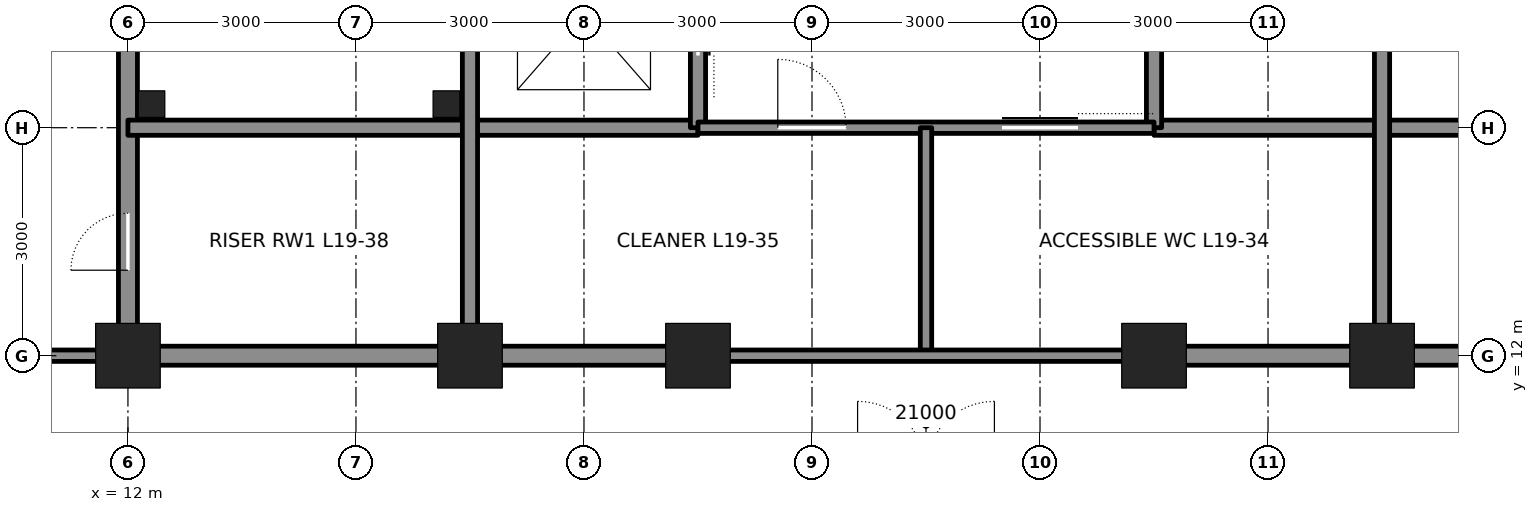
"""IFC4 building model, lengths in metres.
Left out: names, types, materials, properties, quantities, classifications, styles, units other than length and angle.
Written with IfcOpenShell. Run it as: python <this file> out.ifc"""

import sys

from ifc_helpers import new_model, si_unit, direction, frame, frame_2d, origin, origin_2d, place, context, subcontext, project, spatial, rectangle, hollow_rectangle, extrude, element, fill, save


model = new_model("IFC4")
c1 = context("Model", 3, precision=1e-05, world=origin(), true_north=direction((0.0, 1.0)))
c2 = subcontext(c1, "Body", "Model", "MODEL_VIEW")
j1 = project(units=[si_unit("LENGTHUNIT", "METRE"), si_unit("PLANEANGLEUNIT", "RADIAN")], contexts=[c1])
p1 = place(None, origin())
s1 = spatial("IfcSite", under=j1, at=p1, CompositionType="ELEMENT")
p2 = place(p1, origin())
s2 = spatial("IfcBuilding", under=s1, at=p2, CompositionType="ELEMENT")
p3 = place(p2, frame((0.0, 0.0, 91.8)))
s3 = spatial("IfcBuildingStorey", under=s2, at=p3, CompositionType="ELEMENT", Elevation=91.8)
for number, where, z_axis, x_axis in (
    (1, (12.0, 12.0, 0.0), (0.0, 0.0, 1.0), (1.0, 0.0, 0.0)),
    (2, (16.5, 12.0, 0.0), (0.0, 0.0, 1.0), (1.0, 0.0, 0.0)),
    (3, (19.5, 12.0, 0.0), (0.0, 0.0, 1.0), (1.0, 0.0, 0.0)),
    (4, (25.5, 12.0, 0.0), (0.0, 0.0, 1.0), (1.0, 0.0, 0.0)),
    (5, (28.5, 12.0, 0.0), (0.0, 0.0, 1.0), (1.0, 0.0, 0.0)),
):
    element("IfcColumn", number, at=place(p3, frame(where, z_axis=z_axis, x_axis=x_axis)), inside=s3, PredefinedType="COLUMN", context=c2, shape_type="SweptSolid", body=[
        extrude(hollow_rectangle(XDim=0.85, YDim=0.85, WallThickness=0.085, at=origin_2d()), origin(), (0.0, 0.0, 1.0), 4.5),
    ])
p4 = place(p3, frame((12.0, 12.25, 0.0), z_axis=(0.0, 0.0, 1.0), x_axis=(0.0, 1.0, 0.0)))
e6 = element("IfcWall", 6, at=p4, inside=s3, PredefinedType="SOLIDWALL", context=c2, shape_type="SweptSolid", body=[
    extrude(rectangle(XDim=8.5, YDim=0.25, at=frame_2d((4.25, 0.0))), origin(), (0.0, 0.0, 1.0), 3.413),
])
p5 = place(p4, frame((0.875, 0.0, 0.0)))
e7 = element("IfcOpeningElement", 7, at=p5, cuts=e6, PredefinedType="OPENING", context=c2, shape_type="SweptSolid", body=[
    extrude(rectangle(XDim=0.75, YDim=2.1, at=frame_2d((0.375, 1.05))), frame((0.0, 0.135, 0.0), z_axis=(0.0, -1.0, 0.0), x_axis=(1.0, 0.0, 0.0)), (0.0, 0.0, 1.0), 0.27),
])
p6 = place(p3, frame((12.25, 12.0, 0.0), z_axis=(0.0, 0.0, 1.0), x_axis=(1.0, 0.0, 0.0)))
e8 = element("IfcWall", 8, at=p6, inside=s3, PredefinedType="SOLIDWALL", context=c2, shape_type="SweptSolid", body=[
    extrude(rectangle(XDim=4.0, YDim=0.25, at=frame_2d((2.0, 0.0))), origin(), (0.0, 0.0, 1.0), 3.481),
])
for number, where, z_axis, x_axis in (
    (9, (16.75, 12.0, 0.0), (0.0, 0.0, 1.0), (1.0, 0.0, 0.0)),
    (10, (25.75, 12.0, 0.0), (0.0, 0.0, 1.0), (1.0, 0.0, 0.0)),
):
    element("IfcWall", number, at=place(p3, frame(where, z_axis=z_axis, x_axis=x_axis)), inside=s3, PredefinedType="SOLIDWALL", context=c2, shape_type="SweptSolid", body=[
        extrude(rectangle(XDim=2.5, YDim=0.25, at=frame_2d((1.25, 0.0))), origin(), (0.0, 0.0, 1.0), 3.481),
    ])
p7 = place(p3, frame((28.75, 12.0, 0.0), z_axis=(0.0, 0.0, 1.0), x_axis=(1.0, 0.0, 0.0)))
e11 = element("IfcWall", 11, at=p7, inside=s3, PredefinedType="SOLIDWALL", context=c2, shape_type="SweptSolid", body=[
    extrude(rectangle(XDim=4.0, YDim=0.25, at=frame_2d((2.0, 0.0))), origin(), (0.0, 0.0, 1.0), 3.481),
])
for number, where, z_axis, x_axis in (
    (12, (12.0, 15.0, 0.0), (0.0, 0.0, 1.0), (1.0, 0.0, 0.0)),
    (13, (25.5, 15.0, 0.0), (0.0, 0.0, 1.0), (1.0, 0.0, 0.0)),
):
    element("IfcWall", number, at=place(p3, frame(where, z_axis=z_axis, x_axis=x_axis)), inside=s3, PredefinedType="SOLIDWALL", context=c2, shape_type="SweptSolid", body=[
        extrude(rectangle(XDim=7.5, YDim=0.2, at=frame_2d((3.75, 0.0))), origin(), (0.0, 0.0, 1.0), 4.34),
    ])
p8 = place(p3, frame((16.5, 12.25, 0.0), z_axis=(0.0, 0.0, 1.0), x_axis=(0.0, 1.0, 0.0)))
e14 = element("IfcWall", 14, at=p8, inside=s3, PredefinedType="SOLIDWALL", context=c2, shape_type="SweptSolid", body=[
    extrude(rectangle(XDim=8.5, YDim=0.2, at=frame_2d((4.25, 0.0))), origin(), (0.0, 0.0, 1.0), 3.413),
])
p9 = place(p3, frame((19.5, 15.0, 0.0), z_axis=(0.0, 0.0, 1.0), x_axis=(0.0, 1.0, 0.0)))
e15 = element("IfcWall", 15, at=p9, inside=s3, PredefinedType="SOLIDWALL", context=c2, shape_type="SweptSolid", body=[
    extrude(rectangle(XDim=12.0, YDim=0.2, at=frame_2d((6.0, 0.0))), origin(), (0.0, 0.0, 1.0), 3.365),
])
p10 = place(p9, frame((0.95, 0.0, 0.0)))
e16 = element("IfcOpeningElement", 16, at=p10, cuts=e15, PredefinedType="OPENING", context=c2, shape_type="SweptSolid", body=[
    extrude(rectangle(XDim=1.1, YDim=2.1, at=frame_2d((0.55, 1.05))), frame((0.0, 0.11, 0.0), z_axis=(0.0, -1.0, 0.0), x_axis=(1.0, 0.0, 0.0)), (0.0, 0.0, 1.0), 0.22),
])
p11 = place(p9, frame((3.95, 0.0, 0.0)))
e17 = element("IfcOpeningElement", 17, at=p11, cuts=e15, PredefinedType="OPENING", context=c2, shape_type="SweptSolid", body=[
    extrude(rectangle(XDim=1.1, YDim=2.1, at=frame_2d((0.55, 1.05))), frame((0.0, 0.11, 0.0), z_axis=(0.0, -1.0, 0.0), x_axis=(1.0, 0.0, 0.0)), (0.0, 0.0, 1.0), 0.22),
])
p12 = place(p9, frame((6.95, 0.0, 0.0)))
e18 = element("IfcOpeningElement", 18, at=p12, cuts=e15, PredefinedType="OPENING", context=c2, shape_type="SweptSolid", body=[
    extrude(rectangle(XDim=1.1, YDim=2.1, at=frame_2d((0.55, 1.05))), frame((0.0, 0.11, 0.0), z_axis=(0.0, -1.0, 0.0), x_axis=(1.0, 0.0, 0.0)), (0.0, 0.0, 1.0), 0.22),
])
p13 = place(p9, frame((9.95, 0.0, 0.0)))
e19 = element("IfcOpeningElement", 19, at=p13, cuts=e15, PredefinedType="OPENING", context=c2, shape_type="SweptSolid", body=[
    extrude(rectangle(XDim=1.1, YDim=2.1, at=frame_2d((0.55, 1.05))), frame((0.0, 0.11, 0.0), z_axis=(0.0, -1.0, 0.0), x_axis=(1.0, 0.0, 0.0)), (0.0, 0.0, 1.0), 0.22),
])
p14 = place(p3, frame((25.5, 15.0, 0.0), z_axis=(0.0, 0.0, 1.0), x_axis=(0.0, 1.0, 0.0)))
e20 = element("IfcWall", 20, at=p14, inside=s3, PredefinedType="SOLIDWALL", context=c2, shape_type="SweptSolid", body=[
    extrude(rectangle(XDim=12.0, YDim=0.2, at=frame_2d((6.0, 0.0))), origin(), (0.0, 0.0, 1.0), 3.365),
])
p15 = place(p3, frame((28.5, 12.25, 0.0), z_axis=(0.0, 0.0, 1.0), x_axis=(0.0, 1.0, 0.0)))
e21 = element("IfcWall", 21, at=p15, inside=s3, PredefinedType="SOLIDWALL", context=c2, shape_type="SweptSolid", body=[
    extrude(rectangle(XDim=8.5, YDim=0.2, at=frame_2d((4.25, 0.0))), origin(), (0.0, 0.0, 1.0), 3.413),
])
p16 = place(p3, frame((19.5, 15.0, 0.0), z_axis=(0.0, 0.0, 1.0), x_axis=(1.0, 0.0, 0.0)))
e22 = element("IfcWall", 22, at=p16, inside=s3, PredefinedType="PARTITIONING", context=c2, shape_type="SweptSolid", body=[
    extrude(rectangle(XDim=6.0, YDim=0.15, at=frame_2d((3.0, 0.0))), origin(), (0.0, 0.0, 1.0), 4.34),
])
p17 = place(p16, frame((4.0, 0.0, 0.0)))
e23 = element("IfcOpeningElement", 23, at=p17, cuts=e22, PredefinedType="OPENING", context=c2, shape_type="SweptSolid", body=[
    extrude(rectangle(XDim=1.0, YDim=2.1, at=frame_2d((0.5, 1.05))), frame((0.0, 0.085, 0.0), z_axis=(0.0, -1.0, 0.0), x_axis=(1.0, 0.0, 0.0)), (0.0, 0.0, 1.0), 0.17),
])
p18 = place(p16, frame((1.05, 0.0, 0.0)))
e24 = element("IfcOpeningElement", 24, at=p18, cuts=e22, PredefinedType="OPENING", context=c2, shape_type="SweptSolid", body=[
    extrude(rectangle(XDim=0.9, YDim=2.1, at=frame_2d((0.45, 1.05))), frame((0.0, 0.085, 0.0), z_axis=(0.0, -1.0, 0.0), x_axis=(1.0, 0.0, 0.0)), (0.0, 0.0, 1.0), 0.17),
])
p19 = place(p3, frame((22.5, 15.0, 0.0), z_axis=(0.0, 0.0, 1.0), x_axis=(0.0, -1.0, 0.0)))
e25 = element("IfcWall", 25, at=p19, inside=s3, PredefinedType="PARTITIONING", context=c2, shape_type="SweptSolid", body=[
    extrude(rectangle(XDim=3.0, YDim=0.15, at=frame_2d((1.5, 0.0))), origin(), (0.0, 0.0, 1.0), 4.34),
])
p20 = place(p3, frame((19.5, 12.0, 0.0), z_axis=(0.0, 0.0, 1.0), x_axis=(1.0, 0.0, 0.0)))
e26 = element("IfcWall", 26, at=p20, inside=s3, PredefinedType="PARTITIONING", context=c2, shape_type="SweptSolid", body=[
    extrude(rectangle(XDim=6.0, YDim=0.15, at=frame_2d((3.0, 0.0))), origin(), (0.0, 0.0, 1.0), 3.481),
])
p21 = place(p3, frame((10.2, 12.0, -0.3), z_axis=(0.0, 0.0, 1.0), x_axis=(1.0, 0.0, 0.0)))
e27 = element("IfcWall", 27, at=p21, inside=s3, PredefinedType="PARTITIONING", context=c2, shape_type="SweptSolid", body=[
    extrude(rectangle(XDim=1.8, YDim=0.15, at=frame_2d((0.9, 0.0))), origin(), (0.0, 0.0, 1.0), 3.693),
])
for number, where, z_axis, x_axis in (
    (28, (12.31, 15.31, 0.0), (0.0, 0.0, 1.0), (1.0, 0.0, 0.0)),
    (29, (16.19, 15.31, 0.0), (0.0, 0.0, 1.0), (1.0, 0.0, 0.0)),
):
    element("IfcColumn", number, at=place(p3, frame(where, z_axis=z_axis, x_axis=x_axis)), inside=s3, PredefinedType="COLUMN", context=c2, shape_type="SweptSolid", body=[
        extrude(hollow_rectangle(XDim=0.35, YDim=0.35, WallThickness=0.035, at=origin_2d()), origin(), (0.0, 0.0, 1.0), 4.5),
    ])
p22 = place(p5, origin())
e30 = element("IfcDoor", 30, at=p22, inside=s3, OperationType="SINGLE_SWING_LEFT", PredefinedType="DOOR", context=c2, shape_type="SweptSolid", body=[
    extrude(rectangle(XDim=0.75, YDim=2.1, at=frame_2d((0.375, 1.05))), frame((0.0, 0.025, 0.0), z_axis=(0.0, -1.0, 0.0), x_axis=(1.0, 0.0, 0.0)), (0.0, 0.0, 1.0), 0.05),
])
fill(e7, e30)
p23 = place(p17, origin())
e31 = element("IfcDoor", 31, at=p23, inside=s3, OperationType="SLIDING_TO_LEFT", PredefinedType="DOOR", context=c2, shape_type="SweptSolid", body=[
    extrude(rectangle(XDim=1.0, YDim=2.1, at=frame_2d((0.5, 1.05))), frame((0.0, 0.025, 0.0), z_axis=(0.0, -1.0, 0.0), x_axis=(1.0, 0.0, 0.0)), (0.0, 0.0, 1.0), 0.05),
])
fill(e23, e31)
p24 = place(p18, origin())
e32 = element("IfcDoor", 32, at=p24, inside=s3, OperationType="SINGLE_SWING_LEFT", PredefinedType="DOOR", context=c2, shape_type="SweptSolid", body=[
    extrude(rectangle(XDim=0.9, YDim=2.1, at=frame_2d((0.45, 1.05))), frame((0.0, 0.025, 0.0), z_axis=(0.0, -1.0, 0.0), x_axis=(1.0, 0.0, 0.0)), (0.0, 0.0, 1.0), 0.05),
])
fill(e24, e32)
p25 = place(p10, origin())
e33 = element("IfcDoor", 33, at=p25, inside=s3, OperationType="DOUBLE_DOOR_SLIDING", PredefinedType="DOOR", context=c2, shape_type="SweptSolid", body=[
    extrude(rectangle(XDim=1.1, YDim=2.1, at=frame_2d((0.55, 1.05))), frame((0.0, 0.025, 0.0), z_axis=(0.0, -1.0, 0.0), x_axis=(1.0, 0.0, 0.0)), (0.0, 0.0, 1.0), 0.05),
])
fill(e16, e33)
save(model, sys.argv[1])
